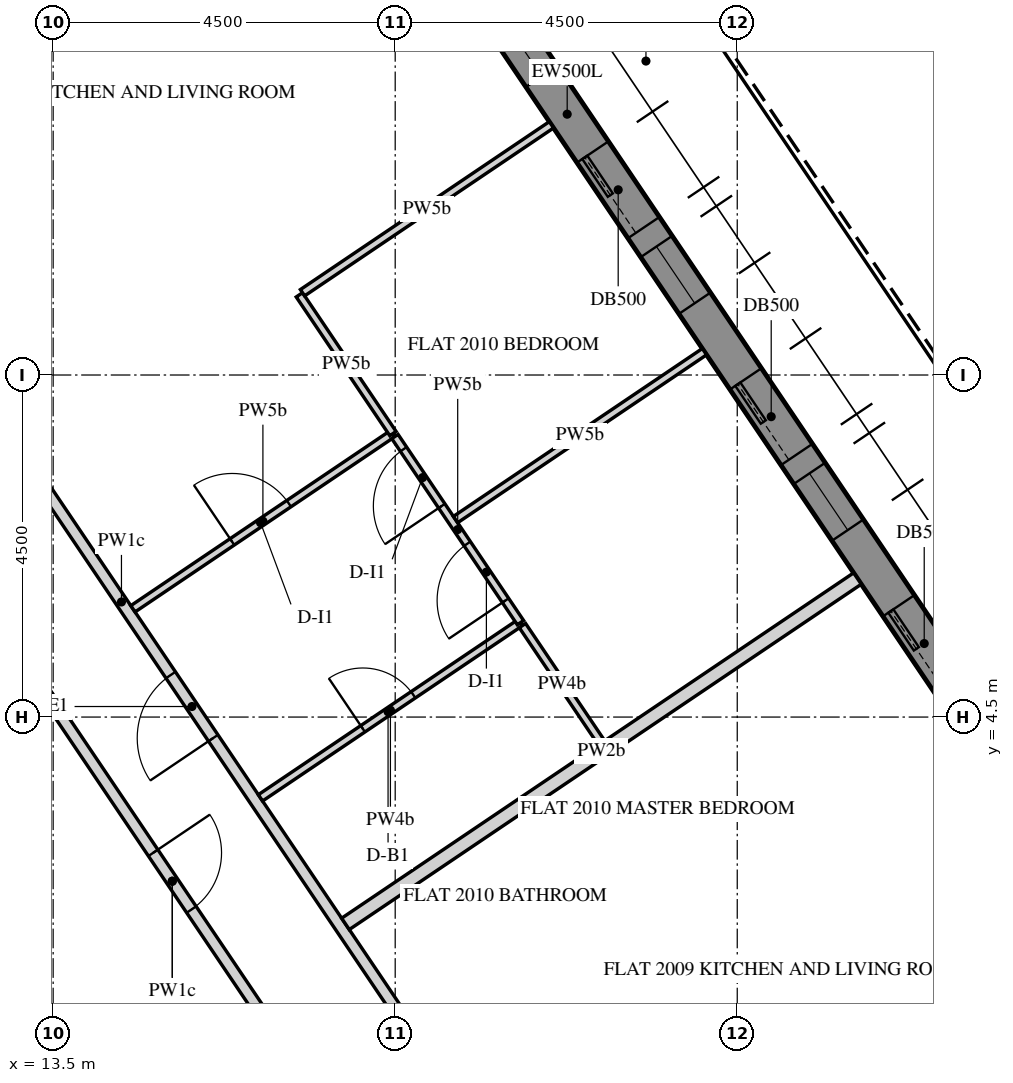
"""IFC4 building model, lengths in metres.
Left out: names, types, materials, properties, quantities, classifications, styles, units other than length and angle.
Written with IfcOpenShell. Run it as: python <this file> out.ifc"""

import sys

from ifc_helpers import new_model, si_unit, direction, frame, frame_2d, origin, place, context, subcontext, project, spatial, polyline, rectangle, outline, extrude, element, fill, save


model = new_model("IFC4")
c1 = context("Model", 3, precision=1e-05, world=origin(), true_north=direction((0.0, 1.0)))
c2 = subcontext(c1, "Body", "Model", "MODEL_VIEW")
j1 = project(units=[si_unit("LENGTHUNIT", "METRE"), si_unit("PLANEANGLEUNIT", "RADIAN")], contexts=[c1])
p1 = place(None, origin())
s1 = spatial("IfcSite", under=j1, at=p1, CompositionType="ELEMENT")
p2 = place(p1, origin())
s2 = spatial("IfcBuilding", under=s1, at=p2, CompositionType="ELEMENT")
p3 = place(p2, frame((0.0, 0.0, 260.1)))
s3 = spatial("IfcBuildingStorey", under=s2, at=p3, CompositionType="ELEMENT", Elevation=260.1)
p4 = place(p3, frame((26.706, 2.879, -0.15), z_axis=(0.0, 0.0, 1.0), x_axis=(-0.559197891507, 0.829034208061, 0.0)))
e1 = element("IfcWall", 1, at=p4, inside=s3, PredefinedType="SOLIDWALL", context=c2, shape_type="SweptSolid", body=[
    extrude(outline(polyline([(0.25, -0.25), (22.795, -0.25), (23.295, 0.25), (-0.25, 0.25), (0.25, -0.25)])), origin(), (0.0, 0.0, 1.0), 3.9),
])
p5 = place(p4, frame((1.323, 0.0, 1.05)))
e2 = element("IfcOpeningElement", 2, at=p5, cuts=e1, PredefinedType="OPENING", context=c2, shape_type="SweptSolid", body=[
    extrude(rectangle(XDim=0.9, YDim=1.5, at=frame_2d((0.45, 0.75))), frame((0.0, 0.26, 0.0), z_axis=(0.0, -1.0, 0.0), x_axis=(1.0, 0.0, 0.0)), (0.0, 0.0, 1.0), 0.52),
])
p6 = place(p4, frame((2.522, 0.0, 0.15)))
e3 = element("IfcOpeningElement", 3, at=p6, cuts=e1, PredefinedType="OPENING", context=c2, shape_type="SweptSolid", body=[
    extrude(rectangle(XDim=1.2, YDim=2.4, at=frame_2d((0.6, 1.2))), frame((0.0, 0.26, 0.0), z_axis=(0.0, -1.0, 0.0), x_axis=(1.0, 0.0, 0.0)), (0.0, 0.0, 1.0), 0.52),
])
p7 = place(p4, frame((4.922, 0.0, 1.05)))
e4 = element("IfcOpeningElement", 4, at=p7, cuts=e1, PredefinedType="OPENING", context=c2, shape_type="SweptSolid", body=[
    extrude(rectangle(XDim=0.9, YDim=1.5, at=frame_2d((0.45, 0.75))), frame((0.0, 0.26, 0.0), z_axis=(0.0, -1.0, 0.0), x_axis=(1.0, 0.0, 0.0)), (0.0, 0.0, 1.0), 0.52),
])
p8 = place(p4, frame((6.122, 0.0, 0.15)))
e5 = element("IfcOpeningElement", 5, at=p8, cuts=e1, PredefinedType="OPENING", context=c2, shape_type="SweptSolid", body=[
    extrude(rectangle(XDim=1.2, YDim=2.4, at=frame_2d((0.6, 1.2))), frame((0.0, 0.26, 0.0), z_axis=(0.0, -1.0, 0.0), x_axis=(1.0, 0.0, 0.0)), (0.0, 0.0, 1.0), 0.52),
])
p9 = place(p4, frame((8.522, 0.0, 1.05)))
e6 = element("IfcOpeningElement", 6, at=p9, cuts=e1, PredefinedType="OPENING", context=c2, shape_type="SweptSolid", body=[
    extrude(rectangle(XDim=0.9, YDim=1.5, at=frame_2d((0.45, 0.75))), frame((0.0, 0.26, 0.0), z_axis=(0.0, -1.0, 0.0), x_axis=(1.0, 0.0, 0.0)), (0.0, 0.0, 1.0), 0.52),
])
p10 = place(p4, frame((9.722, 0.0, 0.15)))
e7 = element("IfcOpeningElement", 7, at=p10, cuts=e1, PredefinedType="OPENING", context=c2, shape_type="SweptSolid", body=[
    extrude(rectangle(XDim=1.2, YDim=2.4, at=frame_2d((0.6, 1.2))), frame((0.0, 0.26, 0.0), z_axis=(0.0, -1.0, 0.0), x_axis=(1.0, 0.0, 0.0)), (0.0, 0.0, 1.0), 0.52),
])
p11 = place(p4, frame((12.122, 0.0, 1.05)))
e8 = element("IfcOpeningElement", 8, at=p11, cuts=e1, PredefinedType="OPENING", context=c2, shape_type="SweptSolid", body=[
    extrude(rectangle(XDim=0.9, YDim=1.5, at=frame_2d((0.45, 0.75))), frame((0.0, 0.26, 0.0), z_axis=(0.0, -1.0, 0.0), x_axis=(1.0, 0.0, 0.0)), (0.0, 0.0, 1.0), 0.52),
])
p12 = place(p4, frame((13.323, 0.0, 0.15)))
e9 = element("IfcOpeningElement", 9, at=p12, cuts=e1, PredefinedType="OPENING", context=c2, shape_type="SweptSolid", body=[
    extrude(rectangle(XDim=1.2, YDim=2.4, at=frame_2d((0.6, 1.2))), frame((0.0, 0.26, 0.0), z_axis=(0.0, -1.0, 0.0), x_axis=(1.0, 0.0, 0.0)), (0.0, 0.0, 1.0), 0.52),
])
p13 = place(p4, frame((15.722, 0.0, 1.05)))
e10 = element("IfcOpeningElement", 10, at=p13, cuts=e1, PredefinedType="OPENING", context=c2, shape_type="SweptSolid", body=[
    extrude(rectangle(XDim=0.9, YDim=1.5, at=frame_2d((0.45, 0.75))), frame((0.0, 0.26, 0.0), z_axis=(0.0, -1.0, 0.0), x_axis=(1.0, 0.0, 0.0)), (0.0, 0.0, 1.0), 0.52),
])
p14 = place(p4, frame((16.922, 0.0, 0.15)))
e11 = element("IfcOpeningElement", 11, at=p14, cuts=e1, PredefinedType="OPENING", context=c2, shape_type="SweptSolid", body=[
    extrude(rectangle(XDim=1.2, YDim=2.4, at=frame_2d((0.6, 1.2))), frame((0.0, 0.26, 0.0), z_axis=(0.0, -1.0, 0.0), x_axis=(1.0, 0.0, 0.0)), (0.0, 0.0, 1.0), 0.52),
])
p15 = place(p4, frame((19.323, 0.0, 1.05)))
e12 = element("IfcOpeningElement", 12, at=p15, cuts=e1, PredefinedType="OPENING", context=c2, shape_type="SweptSolid", body=[
    extrude(rectangle(XDim=0.9, YDim=1.5, at=frame_2d((0.45, 0.75))), frame((0.0, 0.26, 0.0), z_axis=(0.0, -1.0, 0.0), x_axis=(1.0, 0.0, 0.0)), (0.0, 0.0, 1.0), 0.52),
])
p16 = place(p4, frame((20.522, 0.0, 0.15)))
e13 = element("IfcOpeningElement", 13, at=p16, cuts=e1, PredefinedType="OPENING", context=c2, shape_type="SweptSolid", body=[
    extrude(rectangle(XDim=1.2, YDim=2.4, at=frame_2d((0.6, 1.2))), frame((0.0, 0.26, 0.0), z_axis=(0.0, -1.0, 0.0), x_axis=(1.0, 0.0, 0.0)), (0.0, 0.0, 1.0), 0.52),
])
p17 = place(p3, frame((6.351, 11.0, -0.15), z_axis=(0.0, 0.0, 1.0), x_axis=(0.499998894578, 0.866026041999, 0.0)))
e14 = element("IfcWall", 14, at=p17, inside=s3, PredefinedType="SHEAR", context=c2, shape_type="SweptSolid", body=[
    extrude(rectangle(XDim=15.544, YDim=0.4, at=frame_2d((7.772, 0.0))), origin(), (0.0, 0.0, 1.0), 3.9),
])
p18 = place(p17, frame((6.872, 0.0, 0.15)))
e15 = element("IfcOpeningElement", 15, at=p18, cuts=e14, PredefinedType="OPENING", context=c2, shape_type="SweptSolid", body=[
    extrude(rectangle(XDim=1.8, YDim=2.4, at=frame_2d((0.9, 1.2))), frame((0.0, 0.21, 0.0), z_axis=(0.0, -1.0, 0.0), x_axis=(1.0, 0.0, 0.0)), (0.0, 0.0, 1.0), 0.42),
])
p19 = place(p3, frame((19.228, -1.146, 0.0), z_axis=(0.0, 0.0, 1.0), x_axis=(-0.559190017735, 0.829039519001, 0.0)))
e16 = element("IfcWall", 16, at=p19, inside=s3, PredefinedType="PARTITIONING", context=c2, shape_type="SweptSolid", body=[
    extrude(rectangle(XDim=17.273, YDim=0.15, at=frame_2d((8.637, 0.0))), origin(), (0.0, 0.0, 1.0), 2.823),
])
p20 = place(p19, frame((6.478, 0.0, 0.0)))
e17 = element("IfcOpeningElement", 17, at=p20, cuts=e16, PredefinedType="OPENING", context=c2, shape_type="SweptSolid", body=[
    extrude(rectangle(XDim=1.0, YDim=2.1, at=frame_2d((0.5, 1.05))), frame((0.0, 0.085, 0.0), z_axis=(0.0, -1.0, 0.0), x_axis=(1.0, 0.0, 0.0)), (0.0, 0.0, 1.0), 0.17),
])
p21 = place(p3, frame((12.627, 5.958, 0.0), z_axis=(0.0, 0.0, 1.0), x_axis=(0.559185493191, -0.829042570804, 0.0)))
e18 = element("IfcWall", 18, at=p21, inside=s3, PredefinedType="PARTITIONING", context=c2, shape_type="SweptSolid", body=[
    extrude(rectangle(XDim=8.727, YDim=0.15, at=frame_2d((4.363, 0.0))), origin(), (0.0, 0.0, 1.0), 2.823),
])
p22 = place(p21, frame((3.913, 0.0, 0.0)))
e19 = element("IfcOpeningElement", 19, at=p22, cuts=e18, PredefinedType="OPENING", context=c2, shape_type="SweptSolid", body=[
    extrude(rectangle(XDim=0.9, YDim=2.1, at=frame_2d((0.45, 1.05))), frame((0.0, 0.085, 0.0), z_axis=(0.0, -1.0, 0.0), x_axis=(1.0, 0.0, 0.0)), (0.0, 0.0, 1.0), 0.17),
])
p23 = place(p3, frame((24.082, 6.323, 0.0), z_axis=(0.0, 0.0, 1.0), x_axis=(-0.829033253898, -0.55919930609, 0.0)))
e20 = element("IfcWall", 20, at=p23, inside=s3, PredefinedType="PARTITIONING", context=c2, shape_type="SweptSolid", body=[
    extrude(rectangle(XDim=8.125, YDim=0.18, at=frame_2d((4.062, 0.0))), origin(), (0.0, 0.0, 1.0), 2.823),
])
p24 = place(p3, frame((14.55, 5.924, 0.0), z_axis=(0.0, 0.0, 1.0), x_axis=(0.829005765264, 0.559240056827, 0.0)))
e21 = element("IfcWall", 21, at=p24, inside=s3, PredefinedType="PARTITIONING", context=c2, shape_type="SweptSolid", body=[
    extrude(rectangle(XDim=4.125, YDim=0.1, at=frame_2d((2.062, 0.0))), origin(), (0.0, 0.0, 1.0), 2.823),
])
p25 = place(p24, frame((1.575, 0.0, 0.0)))
e22 = element("IfcOpeningElement", 22, at=p25, cuts=e21, PredefinedType="OPENING", context=c2, shape_type="SweptSolid", body=[
    extrude(rectangle(XDim=0.9, YDim=2.1, at=frame_2d((0.45, 1.05))), frame((0.0, 0.06, 0.0), z_axis=(0.0, -1.0, 0.0), x_axis=(1.0, 0.0, 0.0)), (0.0, 0.0, 1.0), 0.12),
])
p26 = place(p3, frame((17.971, 8.229, 0.0), z_axis=(0.0, 0.0, 1.0), x_axis=(-0.559246231198, 0.829001600053, 0.0)))
e23 = element("IfcWall", 23, at=p26, inside=s3, PredefinedType="PARTITIONING", context=c2, shape_type="SweptSolid", body=[
    extrude(rectangle(XDim=2.202, YDim=0.1, at=frame_2d((1.101, 0.0))), origin(), (0.0, 0.0, 1.0), 2.823),
])
p27 = place(p3, frame((16.781, 10.083, 0.0), z_axis=(0.0, 0.0, 1.0), x_axis=(0.829042808667, 0.559185140536, 0.0)))
e24 = element("IfcWall", 24, at=p27, inside=s3, PredefinedType="PARTITIONING", context=c2, shape_type="SweptSolid", body=[
    extrude(rectangle(XDim=3.95, YDim=0.1, at=frame_2d((1.975, 0.0))), origin(), (0.0, 0.0, 1.0), 2.823),
])
p28 = place(p3, frame((16.227, 3.437, 0.0), z_axis=(0.0, 0.0, 1.0), x_axis=(0.829033204172, 0.559199379811, 0.0)))
e25 = element("IfcWall", 25, at=p28, inside=s3, PredefinedType="PARTITIONING", context=c2, shape_type="SweptSolid", body=[
    extrude(rectangle(XDim=4.125, YDim=0.1, at=frame_2d((2.062, 0.0))), origin(), (0.0, 0.0, 1.0), 2.823),
])
p29 = place(p28, frame((1.625, 0.0, 0.0)))
e26 = element("IfcOpeningElement", 26, at=p29, cuts=e25, PredefinedType="OPENING", context=c2, shape_type="SweptSolid", body=[
    extrude(rectangle(XDim=0.8, YDim=2.1, at=frame_2d((0.4, 1.05))), frame((0.0, 0.06, 0.0), z_axis=(0.0, -1.0, 0.0), x_axis=(1.0, 0.0, 0.0)), (0.0, 0.0, 1.0), 0.12),
])
p30 = place(p3, frame((19.648, 5.742, 0.0), z_axis=(0.0, 0.0, 1.0), x_axis=(-0.559193191328, 0.829037378393, 0.0)))
e27 = element("IfcWall", 27, at=p30, inside=s3, PredefinedType="PARTITIONING", context=c2, shape_type="SweptSolid", body=[
    extrude(rectangle(XDim=2.954, YDim=0.1, at=frame_2d((1.477, 0.0))), origin(), (0.0, 0.0, 1.0), 2.823),
])
p31 = place(p30, frame((0.352, 0.0, 0.0)))
e28 = element("IfcOpeningElement", 28, at=p31, cuts=e27, PredefinedType="OPENING", context=c2, shape_type="SweptSolid", body=[
    extrude(rectangle(XDim=0.9, YDim=2.1, at=frame_2d((0.45, 1.05))), frame((0.0, 0.06, 0.0), z_axis=(0.0, -1.0, 0.0), x_axis=(1.0, 0.0, 0.0)), (0.0, 0.0, 1.0), 0.12),
])
p32 = place(p30, frame((1.852, 0.0, 0.0)))
e29 = element("IfcOpeningElement", 29, at=p32, cuts=e27, PredefinedType="OPENING", context=c2, shape_type="SweptSolid", body=[
    extrude(rectangle(XDim=0.9, YDim=2.1, at=frame_2d((0.45, 1.05))), frame((0.0, 0.06, 0.0), z_axis=(0.0, -1.0, 0.0), x_axis=(1.0, 0.0, 0.0)), (0.0, 0.0, 1.0), 0.12),
])
p33 = place(p3, frame((20.715, 4.16, 0.0), z_axis=(0.0, 0.0, 1.0), x_axis=(-0.559200351269, 0.829032548903, 0.0)))
e30 = element("IfcWall", 30, at=p33, inside=s3, PredefinedType="PARTITIONING", context=c2, shape_type="SweptSolid", body=[
    extrude(rectangle(XDim=1.862, YDim=0.1, at=frame_2d((0.931, 0.0))), origin(), (0.0, 0.0, 1.0), 2.823),
])
p34 = place(p3, frame((22.069, 9.307, 0.0), z_axis=(0.0, 0.0, 1.0), x_axis=(-0.829062134085, -0.559156487779, 0.0)))
e31 = element("IfcWall", 31, at=p34, inside=s3, PredefinedType="PARTITIONING", context=c2, shape_type="SweptSolid", body=[
    extrude(rectangle(XDim=3.95, YDim=0.1, at=frame_2d((1.975, 0.0))), origin(), (0.0, 0.0, 1.0), 2.823),
])
p35 = place(p6, frame((0.0, 0.175, 0.0)))
e32 = element("IfcDoor", 32, at=p35, inside=s3, OperationType="SLIDING_TO_LEFT", PredefinedType="DOOR", context=c2, shape_type="SweptSolid", body=[
    extrude(rectangle(XDim=1.2, YDim=2.4, at=frame_2d((0.6, 1.2))), frame((0.0, 0.025, 0.0), z_axis=(0.0, -1.0, 0.0), x_axis=(1.0, 0.0, 0.0)), (0.0, 0.0, 1.0), 0.05),
])
fill(e3, e32)
p36 = place(p7, frame((0.0, 0.18, 0.0)))
e33 = element("IfcWindow", 33, at=p36, inside=s3, PartitioningType="SINGLE_PANEL", PredefinedType="WINDOW", context=c2, shape_type="SweptSolid", body=[
    extrude(rectangle(XDim=0.9, YDim=1.5, at=frame_2d((0.45, 0.75))), frame((0.0, 0.03, 0.0), z_axis=(0.0, -1.0, 0.0), x_axis=(1.0, 0.0, 0.0)), (0.0, 0.0, 1.0), 0.06),
])
fill(e4, e33)
p37 = place(p8, frame((0.0, 0.175, 0.0)))
e34 = element("IfcDoor", 34, at=p37, inside=s3, OperationType="SLIDING_TO_LEFT", PredefinedType="DOOR", context=c2, shape_type="SweptSolid", body=[
    extrude(rectangle(XDim=1.2, YDim=2.4, at=frame_2d((0.6, 1.2))), frame((0.0, 0.025, 0.0), z_axis=(0.0, -1.0, 0.0), x_axis=(1.0, 0.0, 0.0)), (0.0, 0.0, 1.0), 0.05),
])
fill(e5, e34)
p38 = place(p9, frame((0.0, 0.18, 0.0)))
e35 = element("IfcWindow", 35, at=p38, inside=s3, PartitioningType="SINGLE_PANEL", PredefinedType="WINDOW", context=c2, shape_type="SweptSolid", body=[
    extrude(rectangle(XDim=0.9, YDim=1.5, at=frame_2d((0.45, 0.75))), frame((0.0, 0.03, 0.0), z_axis=(0.0, -1.0, 0.0), x_axis=(1.0, 0.0, 0.0)), (0.0, 0.0, 1.0), 0.06),
])
fill(e6, e35)
p39 = place(p10, frame((0.0, 0.175, 0.0)))
e36 = element("IfcDoor", 36, at=p39, inside=s3, OperationType="SLIDING_TO_LEFT", PredefinedType="DOOR", context=c2, shape_type="SweptSolid", body=[
    extrude(rectangle(XDim=1.2, YDim=2.4, at=frame_2d((0.6, 1.2))), frame((0.0, 0.025, 0.0), z_axis=(0.0, -1.0, 0.0), x_axis=(1.0, 0.0, 0.0)), (0.0, 0.0, 1.0), 0.05),
])
fill(e7, e36)
p40 = place(p11, frame((0.0, 0.18, 0.0)))
e37 = element("IfcWindow", 37, at=p40, inside=s3, PartitioningType="SINGLE_PANEL", PredefinedType="WINDOW", context=c2, shape_type="SweptSolid", body=[
    extrude(rectangle(XDim=0.9, YDim=1.5, at=frame_2d((0.45, 0.75))), frame((0.0, 0.03, 0.0), z_axis=(0.0, -1.0, 0.0), x_axis=(1.0, 0.0, 0.0)), (0.0, 0.0, 1.0), 0.06),
])
fill(e8, e37)
p41 = place(p20, origin())
e38 = element("IfcDoor", 38, at=p41, inside=s3, OperationType="SINGLE_SWING_RIGHT", PredefinedType="DOOR", context=c2, shape_type="SweptSolid", body=[
    extrude(rectangle(XDim=1.0, YDim=2.1, at=frame_2d((0.5, 1.05))), frame((0.0, 0.025, 0.0), z_axis=(0.0, -1.0, 0.0), x_axis=(1.0, 0.0, 0.0)), (0.0, 0.0, 1.0), 0.05),
])
fill(e17, e38)
p42 = place(p29, origin())
e39 = element("IfcDoor", 39, at=p42, inside=s3, OperationType="SINGLE_SWING_RIGHT", PredefinedType="DOOR", context=c2, shape_type="SweptSolid", body=[
    extrude(rectangle(XDim=0.8, YDim=2.1, at=frame_2d((0.4, 1.05))), frame((0.0, 0.025, 0.0), z_axis=(0.0, -1.0, 0.0), x_axis=(1.0, 0.0, 0.0)), (0.0, 0.0, 1.0), 0.05),
])
fill(e26, e39)
p43 = place(p25, origin())
e40 = element("IfcDoor", 40, at=p43, inside=s3, OperationType="SINGLE_SWING_RIGHT", PredefinedType="DOOR", context=c2, shape_type="SweptSolid", body=[
    extrude(rectangle(XDim=0.9, YDim=2.1, at=frame_2d((0.45, 1.05))), frame((0.0, 0.025, 0.0), z_axis=(0.0, -1.0, 0.0), x_axis=(1.0, 0.0, 0.0)), (0.0, 0.0, 1.0), 0.05),
])
fill(e22, e40)
p44 = place(p31, origin())
e41 = element("IfcDoor", 41, at=p44, inside=s3, OperationType="SINGLE_SWING_RIGHT", PredefinedType="DOOR", context=c2, shape_type="SweptSolid", body=[
    extrude(rectangle(XDim=0.9, YDim=2.1, at=frame_2d((0.45, 1.05))), frame((0.0, 0.025, 0.0), z_axis=(0.0, -1.0, 0.0), x_axis=(1.0, 0.0, 0.0)), (0.0, 0.0, 1.0), 0.05),
])
fill(e28, e41)
p45 = place(p32, origin())
e42 = element("IfcDoor", 42, at=p45, inside=s3, OperationType="SINGLE_SWING_LEFT", PredefinedType="DOOR", context=c2, shape_type="SweptSolid", body=[
    extrude(rectangle(XDim=0.9, YDim=2.1, at=frame_2d((0.45, 1.05))), frame((0.0, 0.025, 0.0), z_axis=(0.0, -1.0, 0.0), x_axis=(1.0, 0.0, 0.0)), (0.0, 0.0, 1.0), 0.05),
])
fill(e29, e42)
p46 = place(p22, origin())
e43 = element("IfcDoor", 43, at=p46, inside=s3, OperationType="SINGLE_SWING_RIGHT", PredefinedType="DOOR", context=c2, shape_type="SweptSolid", body=[
    extrude(rectangle(XDim=0.9, YDim=2.1, at=frame_2d((0.45, 1.05))), frame((0.0, 0.025, 0.0), z_axis=(0.0, -1.0, 0.0), x_axis=(1.0, 0.0, 0.0)), (0.0, 0.0, 1.0), 0.05),
])
fill(e19, e43)
save(model, sys.argv[1])
